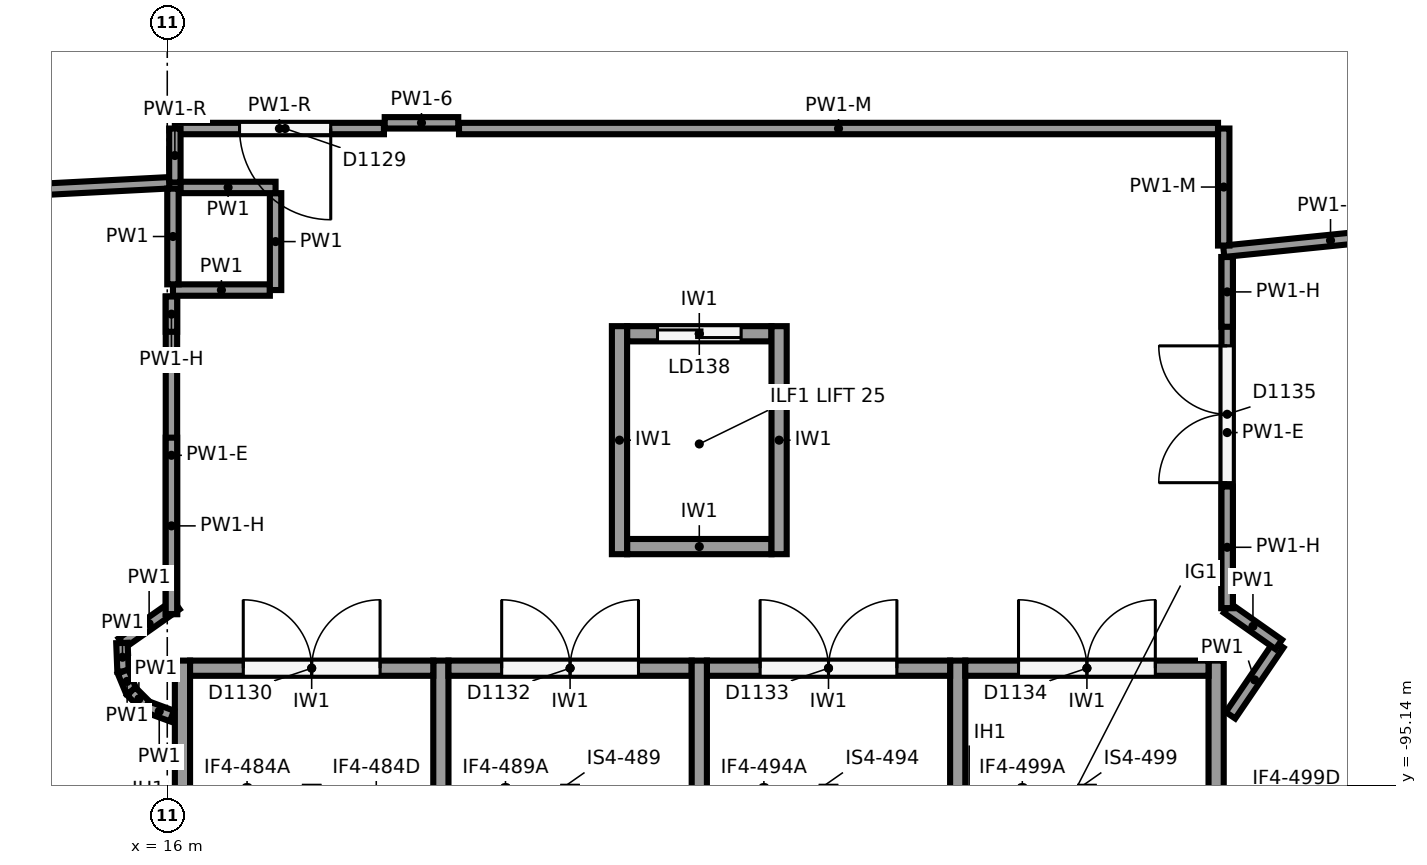
"""IFC4 building model, lengths in metres.
Left out: names, types, materials, properties, quantities, classifications, styles, units other than length and angle.
Written with IfcOpenShell. Run it as: python <this file> out.ifc"""

import sys

from ifc_helpers import new_model, si_unit, direction, frame, frame_2d, origin, origin_2d, place, context, subcontext, project, spatial, rectangle, circle, extrude, element, fill, save


model = new_model("IFC4")
c1 = context("Model", 3, precision=1e-05, world=origin(), true_north=direction((0.0, 1.0)))
c2 = subcontext(c1, "Body", "Model", "MODEL_VIEW")
j1 = project(units=[si_unit("LENGTHUNIT", "METRE"), si_unit("PLANEANGLEUNIT", "RADIAN")], contexts=[c1])
p1 = place(None, origin())
s1 = spatial("IfcSite", under=j1, at=p1, CompositionType="ELEMENT")
p2 = place(p1, origin())
s2 = spatial("IfcBuilding", under=s1, at=p2, CompositionType="ELEMENT")
p3 = place(p2, frame((0.0, 0.0, 12.0)))
s3 = spatial("IfcBuildingStorey", under=s2, at=p3, CompositionType="ELEMENT", Elevation=12.0)
p4 = place(p3, frame((19.119, -85.698, 0.0), z_axis=(0.0, 0.0, 1.0), x_axis=(1.0, 0.0, 0.0)))
e1 = element("IfcColumn", 1, at=p4, inside=s3, PredefinedType="COLUMN", context=c2, shape_type="SweptSolid", body=[
    extrude(circle(Radius=0.4, at=origin_2d()), origin(), (0.0, 0.0, 1.0), 6.0),
])
p5 = place(p3, frame((19.627, -89.904, 0.0), z_axis=(0.0, 0.0, 1.0), x_axis=(1.0, 0.0, 0.0)))
e2 = element("IfcColumn", 2, at=p5, inside=s3, PredefinedType="COLUMN", context=c2, shape_type="SweptSolid", body=[
    extrude(circle(Radius=0.55, at=origin_2d()), origin(), (0.0, 0.0, 1.0), 6.0),
])
p6 = place(p3, frame((31.737, -85.377, 0.0), z_axis=(0.0, 0.0, 1.0), x_axis=(1.0, 0.0, 0.0)))
e3 = element("IfcColumn", 3, at=p6, inside=s3, PredefinedType="COLUMN", context=c2, shape_type="SweptSolid", body=[
    extrude(circle(Radius=0.4, at=origin_2d()), origin(), (0.0, 0.0, 1.0), 6.0),
])
for number, where, z_axis, x_axis in (
    (4, (16.2, -102.3, 0.0), (0.0, 0.0, 1.0), (0.0, 1.0, 0.0)),
    (5, (23.0, -102.3, 0.0), (0.0, 0.0, 1.0), (0.0, 1.0, 0.0)),
    (6, (29.8, -102.3, 0.0), (0.0, 0.0, 1.0), (0.0, 1.0, 0.0)),
    (7, (19.6, -102.3, 0.0), (0.0, 0.0, 1.0), (0.0, 1.0, 0.0)),
    (8, (26.4, -102.3, 0.0), (0.0, 0.0, 1.0), (0.0, 1.0, 0.0)),
):
    element("IfcWall", number, at=place(p3, frame(where, z_axis=z_axis, x_axis=x_axis)), inside=s3, PredefinedType="SHEAR", context=c2, shape_type="SweptSolid", body=[
        extrude(rectangle(XDim=8.8, YDim=0.2, at=frame_2d((4.4, 0.0))), origin(), (0.0, 0.0, 1.0), 5.65),
    ])
p7 = place(p3, frame((16.3, -93.6, 0.0), z_axis=(0.0, 0.0, 1.0), x_axis=(1.0, 0.0, 0.0)))
e9 = element("IfcWall", 9, at=p7, inside=s3, PredefinedType="SHEAR", context=c2, shape_type="SweptSolid", body=[
    extrude(rectangle(XDim=3.2, YDim=0.2, at=frame_2d((1.6, 0.0))), origin(), (0.0, 0.0, 1.0), 5.65),
])
p8 = place(p7, frame((0.7, 0.0, 0.0)))
e10 = element("IfcOpeningElement", 10, at=p8, cuts=e9, PredefinedType="OPENING", context=c2, shape_type="SweptSolid", body=[
    extrude(rectangle(XDim=1.8, YDim=2.1, at=frame_2d((0.9, 1.05))), frame((0.0, 0.11, 0.0), z_axis=(0.0, -1.0, 0.0), x_axis=(1.0, 0.0, 0.0)), (0.0, 0.0, 1.0), 0.22),
])
p9 = place(p3, frame((19.7, -93.6, 0.0), z_axis=(0.0, 0.0, 1.0), x_axis=(1.0, 0.0, 0.0)))
e11 = element("IfcWall", 11, at=p9, inside=s3, PredefinedType="SHEAR", context=c2, shape_type="SweptSolid", body=[
    extrude(rectangle(XDim=3.2, YDim=0.2, at=frame_2d((1.6, 0.0))), origin(), (0.0, 0.0, 1.0), 5.65),
])
p10 = place(p9, frame((0.7, 0.0, 0.0)))
e12 = element("IfcOpeningElement", 12, at=p10, cuts=e11, PredefinedType="OPENING", context=c2, shape_type="SweptSolid", body=[
    extrude(rectangle(XDim=1.8, YDim=2.1, at=frame_2d((0.9, 1.05))), frame((0.0, 0.11, 0.0), z_axis=(0.0, -1.0, 0.0), x_axis=(1.0, 0.0, 0.0)), (0.0, 0.0, 1.0), 0.22),
])
p11 = place(p3, frame((23.1, -93.6, 0.0), z_axis=(0.0, 0.0, 1.0), x_axis=(1.0, 0.0, 0.0)))
e13 = element("IfcWall", 13, at=p11, inside=s3, PredefinedType="SHEAR", context=c2, shape_type="SweptSolid", body=[
    extrude(rectangle(XDim=3.2, YDim=0.2, at=frame_2d((1.6, 0.0))), origin(), (0.0, 0.0, 1.0), 5.65),
])
p12 = place(p11, frame((0.7, 0.0, 0.0)))
e14 = element("IfcOpeningElement", 14, at=p12, cuts=e13, PredefinedType="OPENING", context=c2, shape_type="SweptSolid", body=[
    extrude(rectangle(XDim=1.8, YDim=2.1, at=frame_2d((0.9, 1.05))), frame((0.0, 0.11, 0.0), z_axis=(0.0, -1.0, 0.0), x_axis=(1.0, 0.0, 0.0)), (0.0, 0.0, 1.0), 0.22),
])
p13 = place(p3, frame((26.5, -93.6, 0.0), z_axis=(0.0, 0.0, 1.0), x_axis=(1.0, 0.0, 0.0)))
e15 = element("IfcWall", 15, at=p13, inside=s3, PredefinedType="SHEAR", context=c2, shape_type="SweptSolid", body=[
    extrude(rectangle(XDim=3.2, YDim=0.2, at=frame_2d((1.6, 0.0))), origin(), (0.0, 0.0, 1.0), 5.65),
])
p14 = place(p13, frame((0.7, 0.0, 0.0)))
e16 = element("IfcOpeningElement", 16, at=p14, cuts=e15, PredefinedType="OPENING", context=c2, shape_type="SweptSolid", body=[
    extrude(rectangle(XDim=1.8, YDim=2.1, at=frame_2d((0.9, 1.05))), frame((0.0, 0.11, 0.0), z_axis=(0.0, -1.0, 0.0), x_axis=(1.0, 0.0, 0.0)), (0.0, 0.0, 1.0), 0.22),
])
for number, where, z_axis, x_axis in (
    (17, (21.95, -92.1, 0.0), (0.0, 0.0, 1.0), (0.0, 1.0, 0.0)),
    (18, (24.05, -92.1, 0.0), (0.0, 0.0, 1.0), (0.0, 1.0, 0.0)),
):
    element("IfcWall", number, at=place(p3, frame(where, z_axis=z_axis, x_axis=x_axis)), inside=s3, PredefinedType="SHEAR", context=c2, shape_type="SweptSolid", body=[
        extrude(rectangle(XDim=3.0, YDim=0.2, at=frame_2d((1.5, 0.0))), origin(), (0.0, 0.0, 1.0), 5.65),
    ])
p15 = place(p3, frame((22.05, -92.0, 0.0), z_axis=(0.0, 0.0, 1.0), x_axis=(1.0, 0.0, 0.0)))
e19 = element("IfcWall", 19, at=p15, inside=s3, PredefinedType="SHEAR", context=c2, shape_type="SweptSolid", body=[
    extrude(rectangle(XDim=1.9, YDim=0.2, at=frame_2d((0.95, 0.0))), origin(), (0.0, 0.0, 1.0), 5.65),
])
p16 = place(p3, frame((22.05, -89.2, 0.0), z_axis=(0.0, 0.0, 1.0), x_axis=(1.0, 0.0, 0.0)))
e20 = element("IfcWall", 20, at=p16, inside=s3, PredefinedType="SHEAR", context=c2, shape_type="SweptSolid", body=[
    extrude(rectangle(XDim=1.9, YDim=0.2, at=frame_2d((0.95, 0.0))), origin(), (0.0, 0.0, 1.0), 5.65),
])
p17 = place(p16, frame((0.4, 0.0, 0.0)))
e21 = element("IfcOpeningElement", 21, at=p17, cuts=e20, PredefinedType="OPENING", context=c2, shape_type="SweptSolid", body=[
    extrude(rectangle(XDim=1.1, YDim=2.1, at=frame_2d((0.55, 1.05))), frame((0.0, 0.11, 0.0), z_axis=(0.0, -1.0, 0.0), x_axis=(1.0, 0.0, 0.0)), (0.0, 0.0, 1.0), 0.22),
])
p18 = place(p3, frame((18.851, -86.5, 0.0), z_axis=(0.0, 0.0, 1.0), x_axis=(-1.0, 0.0, 0.0)))
e22 = element("IfcWall", 22, at=p18, inside=s3, PredefinedType="PARTITIONING", context=c2, shape_type="SweptSolid", body=[
    extrude(rectangle(XDim=2.751, YDim=0.15, at=frame_2d((1.375, 0.0))), origin(), (0.0, 0.0, 1.0), 4.181),
])
p19 = place(p18, frame((0.7, 0.0, 0.0)))
e23 = element("IfcOpeningElement", 23, at=p19, cuts=e22, PredefinedType="OPENING", context=c2, shape_type="SweptSolid", body=[
    extrude(rectangle(XDim=1.2, YDim=2.1, at=frame_2d((0.6, 1.05))), frame((0.0, 0.085, 0.0), z_axis=(0.0, -1.0, 0.0), x_axis=(1.0, 0.0, 0.0)), (0.0, 0.0, 1.0), 0.17),
])
p20 = place(p3, frame((16.1, -86.5, 0.0), z_axis=(0.0, 0.0, 1.0), x_axis=(0.0, -1.0, 0.0)))
e24 = element("IfcWall", 24, at=p20, inside=s3, PredefinedType="PARTITIONING", context=c2, shape_type="SweptSolid", body=[
    extrude(rectangle(XDim=0.71, YDim=0.15, at=frame_2d((0.355, 0.0))), origin(), (0.0, 0.0, 1.0), 4.181),
])
p21 = place(p3, frame((16.025, -87.214, 0.0), z_axis=(0.0, 0.0, 1.0), x_axis=(-0.998660530851, -0.051741126006, 0.0)))
e25 = element("IfcWall", 25, at=p21, inside=s3, PredefinedType="PARTITIONING", context=c2, shape_type="SweptSolid", body=[
    extrude(rectangle(XDim=9.027, YDim=0.15, at=frame_2d((4.513, 0.0))), origin(), (0.0, 0.0, 1.0), 4.181),
])
p22 = place(p3, frame((32.71, -87.83, 0.0), z_axis=(0.0, 0.0, 1.0), x_axis=(-0.994882835279, -0.101035360476, 0.0)))
e26 = element("IfcWall", 26, at=p22, inside=s3, PredefinedType="PARTITIONING", context=c2, shape_type="SweptSolid", body=[
    extrude(rectangle(XDim=2.825, YDim=0.15, at=frame_2d((1.412, 0.0))), origin(), (0.0, 0.0, 1.0), 3.655),
])
p23 = place(p3, frame((29.9, -88.04, 0.0), z_axis=(0.0, 0.0, 1.0), x_axis=(0.0, 1.0, 0.0)))
e27 = element("IfcWall", 27, at=p23, inside=s3, PredefinedType="PARTITIONING", context=c2, shape_type="SweptSolid", body=[
    extrude(rectangle(XDim=1.54, YDim=0.15, at=frame_2d((0.77, 0.0))), origin(), (0.0, 0.0, 1.0), 3.655),
])
p24 = place(p3, frame((29.825, -86.5, 0.0), z_axis=(0.0, 0.0, 1.0), x_axis=(-1.0, 0.0, 0.0)))
e28 = element("IfcWall", 28, at=p24, inside=s3, PredefinedType="PARTITIONING", context=c2, shape_type="SweptSolid", body=[
    extrude(rectangle(XDim=9.986, YDim=0.15, at=frame_2d((4.993, 0.0))), origin(), (0.0, 0.0, 1.0), 3.655),
])
p25 = place(p3, frame((16.075, -88.625, 0.0), z_axis=(0.0, 0.0, 1.0), x_axis=(1.0, 0.0, 0.0)))
e29 = element("IfcWall", 29, at=p25, inside=s3, PredefinedType="PARTITIONING", context=c2, shape_type="SweptSolid", body=[
    extrude(rectangle(XDim=1.275, YDim=0.15, at=frame_2d((0.638, 0.0))), origin(), (0.0, 0.0, 1.0), 5.65),
])
p26 = place(p3, frame((17.425, -88.625, 0.0), z_axis=(0.0, 0.0, 1.0), x_axis=(0.0, 1.0, 0.0)))
e30 = element("IfcWall", 30, at=p26, inside=s3, PredefinedType="PARTITIONING", context=c2, shape_type="SweptSolid", body=[
    extrude(rectangle(XDim=1.275, YDim=0.15, at=frame_2d((0.637, 0.0))), origin(), (0.0, 0.0, 1.0), 5.65),
])
p27 = place(p3, frame((17.425, -87.275, 0.0), z_axis=(0.0, 0.0, 1.0), x_axis=(-1.0, 0.0, 0.0)))
e31 = element("IfcWall", 31, at=p27, inside=s3, PredefinedType="PARTITIONING", context=c2, shape_type="SweptSolid", body=[
    extrude(rectangle(XDim=1.249, YDim=0.15, at=frame_2d((0.625, 0.0))), origin(), (0.0, 0.0, 1.0), 5.65),
])
p28 = place(p3, frame((16.075, -87.291, 0.0), z_axis=(0.0, 0.0, 1.0), x_axis=(0.0, -1.0, 0.0)))
e32 = element("IfcWall", 32, at=p28, inside=s3, PredefinedType="PARTITIONING", context=c2, shape_type="SweptSolid", body=[
    extrude(rectangle(XDim=1.259, YDim=0.15, at=frame_2d((0.629, 0.0))), origin(), (0.0, 0.0, 1.0), 5.65),
])
p29 = place(p3, frame((16.119, -92.764, 0.0), z_axis=(0.0, 0.0, 1.0), x_axis=(-0.817709179483, -0.575631564275, 0.0)))
e33 = element("IfcWall", 33, at=p29, inside=s3, PredefinedType="PARTITIONING", context=c2, shape_type="SweptSolid", body=[
    extrude(rectangle(XDim=0.875, YDim=0.15, at=frame_2d((0.438, 0.0))), origin(), (0.0, 0.0, 1.0), 5.65),
])
p30 = place(p3, frame((15.404, -93.268, 0.0), z_axis=(0.0, 0.0, 1.0), x_axis=(0.038982051143, -0.999239910977, 0.0)))
e34 = element("IfcWall", 34, at=p30, inside=s3, PredefinedType="PARTITIONING", context=c2, shape_type="SweptSolid", body=[
    extrude(rectangle(XDim=0.376, YDim=0.15, at=frame_2d((0.188, 0.0))), origin(), (0.0, 0.0, 1.0), 5.65),
])
p31 = place(p3, frame((15.418, -93.643, 0.0), z_axis=(0.0, 0.0, 1.0), x_axis=(0.382275228123, -0.924048510611, 0.0)))
e35 = element("IfcWall", 35, at=p31, inside=s3, PredefinedType="PARTITIONING", context=c2, shape_type="SweptSolid", body=[
    extrude(rectangle(XDim=0.282, YDim=0.15, at=frame_2d((0.141, 0.0))), origin(), (0.0, 0.0, 1.0), 5.65),
])
p32 = place(p3, frame((15.526, -93.904, 0.0), z_axis=(0.0, 0.0, 1.0), x_axis=(0.707534941396, -0.706678361564, 0.0)))
e36 = element("IfcWall", 36, at=p32, inside=s3, PredefinedType="PARTITIONING", context=c2, shape_type="SweptSolid", body=[
    extrude(rectangle(XDim=0.285, YDim=0.15, at=frame_2d((0.143, 0.0))), origin(), (0.0, 0.0, 1.0), 5.65),
])
p33 = place(p3, frame((15.728, -94.105, 0.0), z_axis=(0.0, 0.0, 1.0), x_axis=(0.937674325327, -0.347515265308, 0.0)))
e37 = element("IfcWall", 37, at=p33, inside=s3, PredefinedType="PARTITIONING", context=c2, shape_type="SweptSolid", body=[
    extrude(rectangle(XDim=0.356, YDim=0.15, at=frame_2d((0.178, 0.0))), origin(), (0.0, 0.0, 1.0), 5.65),
])
p34 = place(p3, frame((29.99, -94.22, 0.0), z_axis=(0.0, 0.0, 1.0), x_axis=(0.562570599462, 0.826749248939, 0.0)))
e38 = element("IfcWall", 38, at=p34, inside=s3, PredefinedType="PARTITIONING", context=c2, shape_type="SweptSolid", body=[
    extrude(rectangle(XDim=1.127, YDim=0.15, at=frame_2d((0.564, 0.0))), origin(), (0.0, 0.0, 1.0), 5.65),
])
p35 = place(p3, frame((30.624, -93.288, 0.0), z_axis=(0.0, 0.0, 1.0), x_axis=(-0.817334487726, 0.5761634622, 0.0)))
e39 = element("IfcWall", 39, at=p35, inside=s3, PredefinedType="PARTITIONING", context=c2, shape_type="SweptSolid", body=[
    extrude(rectangle(XDim=0.83, YDim=0.15, at=frame_2d((0.415, 0.0))), origin(), (0.0, 0.0, 1.0), 5.65),
])
p36 = place(p3, frame((29.945, -92.809, 0.0), z_axis=(0.0, 0.0, 1.0), x_axis=(5.285971e-05, 0.999999998603, 0.0)))
e40 = element("IfcWall", 40, at=p36, inside=s3, PredefinedType="PARTITIONING", context=c2, shape_type="SweptSolid", body=[
    extrude(rectangle(XDim=4.619, YDim=0.15, at=frame_2d((2.309, 0.0))), origin(), (0.0, 0.0, 1.0), 4.35),
])
p37 = place(p36, frame((1.65, 0.0, 0.0)))
e41 = element("IfcOpeningElement", 41, at=p37, cuts=e40, PredefinedType="OPENING", context=c2, shape_type="SweptSolid", body=[
    extrude(rectangle(XDim=1.8, YDim=2.1, at=frame_2d((0.9, 1.05))), frame((0.0, 0.085, 0.0), z_axis=(0.0, -1.0, 0.0), x_axis=(1.0, 0.0, 0.0)), (0.0, 0.0, 1.0), 0.17),
])
p38 = place(p3, frame((29.945, -92.809, 4.35), z_axis=(0.0, 0.0, 1.0), x_axis=(0.0, 1.0, 0.0)))
e42 = element("IfcWall", 42, at=p38, inside=s3, PredefinedType="PARTITIONING", context=c2, shape_type="SweptSolid", body=[
    extrude(rectangle(XDim=1.6, YDim=0.15, at=frame_2d((0.8, 0.0))), origin(), (0.0, 0.0, 1.0), 1.3),
])
p39 = place(p3, frame((29.945, -89.108, 4.35), z_axis=(0.0, 0.0, 1.0), x_axis=(0.00026602819, 0.999999964615, 0.0)))
e43 = element("IfcWall", 43, at=p39, inside=s3, PredefinedType="PARTITIONING", context=c2, shape_type="SweptSolid", body=[
    extrude(rectangle(XDim=0.918, YDim=0.15, at=frame_2d((0.459, 0.0))), origin(), (0.0, 0.0, 1.0), 1.3),
])
p40 = place(p3, frame((19.829, -86.425, 0.0), z_axis=(0.0, 0.0, 1.0), x_axis=(-1.0, 0.0, 0.0)))
e44 = element("IfcWall", 44, at=p40, inside=s3, PredefinedType="PARTITIONING", context=c2, shape_type="SweptSolid", body=[
    extrude(rectangle(XDim=0.968, YDim=0.15, at=frame_2d((0.484, 0.0))), origin(), (0.0, 0.0, 1.0), 4.9),
])
p41 = place(p3, frame((16.055, -88.71, 0.0), z_axis=(0.0, 0.0, 1.0), x_axis=(0.0, -1.0, 0.0)))
e45 = element("IfcWall", 45, at=p41, inside=s3, PredefinedType="PARTITIONING", context=c2, shape_type="SweptSolid", body=[
    extrude(rectangle(XDim=4.178, YDim=0.15, at=frame_2d((2.089, 0.0))), origin(), (0.0, 0.0, 1.0), 4.35),
])
p42 = place(p3, frame((16.055, -88.71, 4.35), z_axis=(0.0, 0.0, 1.0), x_axis=(0.0, -1.0, 0.0)))
e46 = element("IfcWall", 46, at=p42, inside=s3, PredefinedType="PARTITIONING", context=c2, shape_type="SweptSolid", body=[
    extrude(rectangle(XDim=0.464, YDim=0.15, at=frame_2d((0.232, 0.0))), origin(), (0.0, 0.0, 1.0), 1.3),
])
p43 = place(p3, frame((16.055, -90.567, 4.35), z_axis=(0.0, 0.0, 1.0), x_axis=(0.0, -1.0, 0.0)))
e47 = element("IfcWall", 47, at=p43, inside=s3, PredefinedType="PARTITIONING", context=c2, shape_type="SweptSolid", body=[
    extrude(rectangle(XDim=2.321, YDim=0.15, at=frame_2d((1.161, 0.0))), origin(), (0.0, 0.0, 1.0), 1.3),
])
p44 = place(p8, origin())
e48 = element("IfcDoor", 48, at=p44, inside=s3, OperationType="DOUBLE_DOOR_SINGLE_SWING", PredefinedType="DOOR", context=c2, shape_type="SweptSolid", body=[
    extrude(rectangle(XDim=1.8, YDim=2.1, at=frame_2d((0.9, 1.05))), frame((0.0, 0.025, 0.0), z_axis=(0.0, -1.0, 0.0), x_axis=(1.0, 0.0, 0.0)), (0.0, 0.0, 1.0), 0.05),
])
fill(e10, e48)
p45 = place(p10, origin())
e49 = element("IfcDoor", 49, at=p45, inside=s3, OperationType="DOUBLE_DOOR_SINGLE_SWING", PredefinedType="DOOR", context=c2, shape_type="SweptSolid", body=[
    extrude(rectangle(XDim=1.8, YDim=2.1, at=frame_2d((0.9, 1.05))), frame((0.0, 0.025, 0.0), z_axis=(0.0, -1.0, 0.0), x_axis=(1.0, 0.0, 0.0)), (0.0, 0.0, 1.0), 0.05),
])
fill(e12, e49)
p46 = place(p12, origin())
e50 = element("IfcDoor", 50, at=p46, inside=s3, OperationType="DOUBLE_DOOR_SINGLE_SWING", PredefinedType="DOOR", context=c2, shape_type="SweptSolid", body=[
    extrude(rectangle(XDim=1.8, YDim=2.1, at=frame_2d((0.9, 1.05))), frame((0.0, 0.025, 0.0), z_axis=(0.0, -1.0, 0.0), x_axis=(1.0, 0.0, 0.0)), (0.0, 0.0, 1.0), 0.05),
])
fill(e14, e50)
p47 = place(p14, origin())
e51 = element("IfcDoor", 51, at=p47, inside=s3, OperationType="DOUBLE_DOOR_SINGLE_SWING", PredefinedType="DOOR", context=c2, shape_type="SweptSolid", body=[
    extrude(rectangle(XDim=1.8, YDim=2.1, at=frame_2d((0.9, 1.05))), frame((0.0, 0.025, 0.0), z_axis=(0.0, -1.0, 0.0), x_axis=(1.0, 0.0, 0.0)), (0.0, 0.0, 1.0), 0.05),
])
fill(e16, e51)
p48 = place(p17, origin())
e52 = element("IfcDoor", 52, at=p48, inside=s3, OperationType="SLIDING_TO_RIGHT", PredefinedType="DOOR", context=c2, shape_type="SweptSolid", body=[
    extrude(rectangle(XDim=1.1, YDim=2.1, at=frame_2d((0.55, 1.05))), frame((0.0, 0.025, 0.0), z_axis=(0.0, -1.0, 0.0), x_axis=(1.0, 0.0, 0.0)), (0.0, 0.0, 1.0), 0.05),
])
fill(e21, e52)
p49 = place(p19, origin())
e53 = element("IfcDoor", 53, at=p49, inside=s3, OperationType="SINGLE_SWING_LEFT", PredefinedType="DOOR", context=c2, shape_type="SweptSolid", body=[
    extrude(rectangle(XDim=1.2, YDim=2.1, at=frame_2d((0.6, 1.05))), frame((0.0, 0.025, 0.0), z_axis=(0.0, -1.0, 0.0), x_axis=(1.0, 0.0, 0.0)), (0.0, 0.0, 1.0), 0.05),
])
fill(e23, e53)
p50 = place(p37, origin())
e54 = element("IfcDoor", 54, at=p50, inside=s3, OperationType="DOUBLE_DOOR_SINGLE_SWING", PredefinedType="DOOR", context=c2, shape_type="SweptSolid", body=[
    extrude(rectangle(XDim=1.8, YDim=2.1, at=frame_2d((0.9, 1.05))), frame((0.0, 0.025, 0.0), z_axis=(0.0, -1.0, 0.0), x_axis=(1.0, 0.0, 0.0)), (0.0, 0.0, 1.0), 0.05),
])
fill(e41, e54)
save(model, sys.argv[1])
